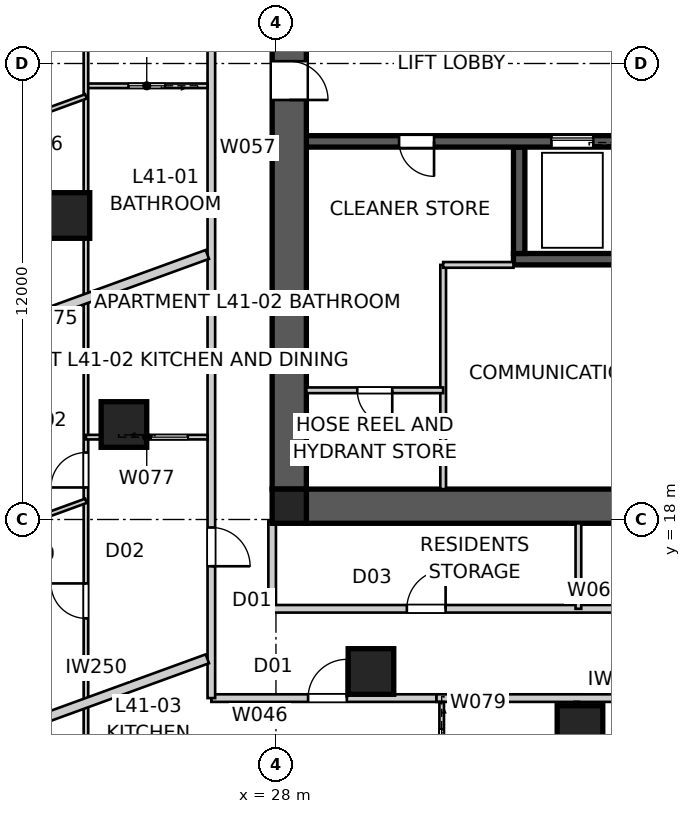
"""IFC4 building model, lengths in metres.
Left out: names, types, materials, properties, quantities, classifications, styles, units other than length and angle.
Written with IfcOpenShell. Run it as: python <this file> out.ifc"""

import sys

from ifc_helpers import new_model, si_unit, direction, frame, frame_2d, origin, origin_2d, place, context, subcontext, project, spatial, polyline, rectangle, outline, extrude, element, fill, save


model = new_model("IFC4")
c1 = context("Model", 3, precision=1e-05, world=origin(), true_north=direction((0.0, 1.0)))
c2 = subcontext(c1, "Body", "Model", "MODEL_VIEW")
j1 = project(units=[si_unit("LENGTHUNIT", "METRE"), si_unit("PLANEANGLEUNIT", "RADIAN")], contexts=[c1])
p1 = place(None, origin())
s1 = spatial("IfcSite", under=j1, at=p1, CompositionType="ELEMENT")
p2 = place(p1, origin())
s2 = spatial("IfcBuilding", under=s1, at=p2, CompositionType="ELEMENT")
p3 = place(p2, frame((0.0, 0.0, 150.6)))
s3 = spatial("IfcBuildingStorey", under=s2, at=p3, CompositionType="ELEMENT", Elevation=150.6)
p4 = place(p3, frame((51.2, 18.35, 0.0), z_axis=(0.0, 0.0, 1.0), x_axis=(-1.0, 0.0, 0.0)))
e1 = element("IfcWall", 1, at=p4, inside=s3, PredefinedType="SHEAR", context=c2, shape_type="SweptSolid", body=[
    extrude(outline(polyline([(0.0, -0.45), (22.4, -0.45), (22.4, -0.025), (22.85, -0.025), (22.85, 0.025), (22.4, 0.025), (22.4, 0.45), (0.0, 0.45), (0.0, 0.025), (-0.45, 0.025), (-0.45, -0.025), (0.0, -0.025), (0.0, -0.45)])), origin(), (0.0, 0.0, 1.0), 3.4),
])
p5 = place(p3, frame((28.35, 41.2, 0.0), z_axis=(0.0, 0.0, 1.0), x_axis=(0.0, -1.0, 0.0)))
e2 = element("IfcWall", 2, at=p5, inside=s3, PredefinedType="SHEAR", context=c2, shape_type="SweptSolid", body=[
    extrude(outline(polyline([(0.0, -0.45), (22.4, -0.45), (22.4, -0.025), (22.85, -0.025), (22.85, 0.025), (22.4, 0.025), (22.4, 0.45), (0.0, 0.45), (0.0, 0.025), (-0.45, 0.025), (-0.45, -0.025), (0.0, -0.025), (0.0, -0.45)])), origin(), (0.0, 0.0, 1.0), 3.4),
])
p6 = place(p5, frame((11.14, 0.0, 0.0)))
e3 = element("IfcOpeningElement", 3, at=p6, cuts=e2, PredefinedType="OPENING", context=c2, shape_type="SweptSolid", body=[
    extrude(rectangle(XDim=1.02, YDim=2.4, at=frame_2d((0.51, 1.2))), frame((0.0, 0.46, 0.0), z_axis=(0.0, -1.0, 0.0), x_axis=(1.0, 0.0, 0.0)), (0.0, 0.0, 1.0), 0.92),
])
p7 = place(p3, frame((51.2, 27.95, 0.0), z_axis=(0.0, 0.0, 1.0), x_axis=(-1.0, 0.0, 0.0)))
e4 = element("IfcWall", 4, at=p7, inside=s3, PredefinedType="SHEAR", context=c2, shape_type="SweptSolid", body=[
    extrude(rectangle(XDim=22.4, YDim=0.3, at=frame_2d((11.2, 0.0))), origin(), (0.0, 0.0, 1.0), 3.4),
])
p8 = place(p7, frame((19.04, 0.0, 0.0)))
e5 = element("IfcOpeningElement", 5, at=p8, cuts=e4, PredefinedType="OPENING", context=c2, shape_type="SweptSolid", body=[
    extrude(rectangle(XDim=0.92, YDim=2.1, at=frame_2d((0.46, 1.05))), frame((0.0, 0.16, 0.0), z_axis=(0.0, -1.0, 0.0), x_axis=(1.0, 0.0, 0.0)), (0.0, 0.0, 1.0), 0.32),
])
p9 = place(p7, frame((1.265, 0.0, 0.0)))
e6 = element("IfcOpeningElement", 6, at=p9, cuts=e4, PredefinedType="OPENING", context=c2, shape_type="SweptSolid", body=[
    extrude(rectangle(XDim=1.02, YDim=2.1, at=frame_2d((0.51, 1.05))), frame((0.0, 0.16, 0.0), z_axis=(0.0, -1.0, 0.0), x_axis=(1.0, 0.0, 0.0)), (0.0, 0.0, 1.0), 0.32),
])
p10 = place(p7, frame((4.015, 0.0, 0.0)))
e7 = element("IfcOpeningElement", 7, at=p10, cuts=e4, PredefinedType="OPENING", context=c2, shape_type="SweptSolid", body=[
    extrude(rectangle(XDim=0.92, YDim=2.1, at=frame_2d((0.46, 1.05))), frame((0.0, 0.16, 0.0), z_axis=(0.0, -1.0, 0.0), x_axis=(1.0, 0.0, 0.0)), (0.0, 0.0, 1.0), 0.32),
])
p11 = place(p7, frame((6.45, 0.0, 0.0)))
e8 = element("IfcOpeningElement", 8, at=p11, cuts=e4, PredefinedType="OPENING", context=c2, shape_type="SweptSolid", body=[
    extrude(rectangle(XDim=1.1, YDim=2.1, at=frame_2d((0.55, 1.05))), frame((0.0, 0.16, 0.0), z_axis=(0.0, -1.0, 0.0), x_axis=(1.0, 0.0, 0.0)), (0.0, 0.0, 1.0), 0.32),
])
p12 = place(p7, frame((9.25, 0.0, 0.0)))
e9 = element("IfcOpeningElement", 9, at=p12, cuts=e4, PredefinedType="OPENING", context=c2, shape_type="SweptSolid", body=[
    extrude(rectangle(XDim=1.1, YDim=2.1, at=frame_2d((0.55, 1.05))), frame((0.0, 0.16, 0.0), z_axis=(0.0, -1.0, 0.0), x_axis=(1.0, 0.0, 0.0)), (0.0, 0.0, 1.0), 0.32),
])
p13 = place(p7, frame((14.85, 0.0, 0.0)))
e10 = element("IfcOpeningElement", 10, at=p13, cuts=e4, PredefinedType="OPENING", context=c2, shape_type="SweptSolid", body=[
    extrude(rectangle(XDim=1.1, YDim=2.1, at=frame_2d((0.55, 1.05))), frame((0.0, 0.16, 0.0), z_axis=(0.0, -1.0, 0.0), x_axis=(1.0, 0.0, 0.0)), (0.0, 0.0, 1.0), 0.32),
])
p14 = place(p3, frame((45.75, 24.85, 0.0), z_axis=(0.0, 0.0, 1.0), x_axis=(-1.0, 0.0, 0.0)))
e11 = element("IfcWall", 11, at=p14, inside=s3, PredefinedType="SHEAR", context=c2, shape_type="SweptSolid", body=[
    extrude(rectangle(XDim=11.5, YDim=0.3, at=frame_2d((5.75, 0.0))), origin(), (0.0, 0.0, 1.0), 3.4),
])
p15 = place(p3, frame((34.4, 27.8, 0.0), z_axis=(0.0, 0.0, 1.0), x_axis=(0.0, -1.0, 0.0)))
e12 = element("IfcWall", 12, at=p15, inside=s3, PredefinedType="SHEAR", context=c2, shape_type="SweptSolid", body=[
    extrude(rectangle(XDim=2.8, YDim=0.3, at=frame_2d((1.4, 0.0))), origin(), (0.0, 0.0, 1.0), 3.4),
])
p16 = place(p3, frame((28.35, 18.35, 0.0), z_axis=(0.0, 0.0, 1.0), x_axis=(1.0, 0.0, 0.0)))
e13 = element("IfcColumn", 13, at=p16, inside=s3, PredefinedType="COLUMN", context=c2, shape_type="SweptSolid", body=[
    extrude(rectangle(XDim=0.9, YDim=0.9, at=origin_2d()), origin(), (0.0, 0.0, 1.0), 3.4),
])
for number, where, z_axis, x_axis in (
    (14, (22.5, 26.0, 0.0), (0.0, 0.0, 1.0), (1.0, 0.0, 0.0)),
    (15, (24.0, 20.5, 0.0), (0.0, 0.0, 1.0), (1.0, 0.0, 0.0)),
    (16, (30.5, 14.0, 0.0), (0.0, 0.0, 1.0), (1.0, 0.0, 0.0)),
    (17, (36.0, 12.5, 0.0), (0.0, 0.0, 1.0), (1.0, 0.0, 0.0)),
):
    element("IfcColumn", number, at=place(p3, frame(where, z_axis=z_axis, x_axis=x_axis)), inside=s3, PredefinedType="COLUMN", context=c2, shape_type="SweptSolid", body=[
        extrude(rectangle(XDim=1.2, YDim=1.2, at=origin_2d()), origin(), (0.0, 0.0, 1.0), 3.4),
    ])
p17 = place(p3, frame((26.3, 13.3, 0.0), z_axis=(0.0, 0.0, 1.0), x_axis=(1.0, 0.0, 0.0)))
e18 = element("IfcWall", 18, at=p17, inside=s3, PredefinedType="PARTITIONING", context=c2, shape_type="SweptSolid", body=[
    extrude(rectangle(XDim=5.925, YDim=0.2, at=frame_2d((2.962, 0.0))), origin(), (0.0, 0.0, 1.0), 3.25),
])
p18 = place(p17, frame((2.545, 0.0, 0.0)))
e19 = element("IfcOpeningElement", 19, at=p18, cuts=e18, PredefinedType="OPENING", context=c2, shape_type="SweptSolid", body=[
    extrude(rectangle(XDim=1.02, YDim=2.34, at=frame_2d((0.51, 1.17))), frame((0.0, 0.11, 0.0), z_axis=(0.0, -1.0, 0.0), x_axis=(1.0, 0.0, 0.0)), (0.0, 0.0, 1.0), 0.22),
])
p19 = place(p3, frame((32.225, 13.3, 0.0), z_axis=(0.0, 0.0, 1.0), x_axis=(1.0, 0.0, 0.0)))
e20 = element("IfcWall", 20, at=p19, inside=s3, PredefinedType="PARTITIONING", context=c2, shape_type="SweptSolid", body=[
    extrude(rectangle(XDim=1.684, YDim=0.2, at=frame_2d((0.842, 0.0))), origin(), (0.0, 0.0, 1.0), 2.55),
])
p20 = place(p3, frame((33.908, 13.3, 0.0), z_axis=(0.0, 0.0, 1.0), x_axis=(1.0, 0.0, 0.0)))
e21 = element("IfcWall", 21, at=p20, inside=s3, PredefinedType="PARTITIONING", context=c2, shape_type="SweptSolid", body=[
    extrude(rectangle(XDim=12.183, YDim=0.2, at=frame_2d((6.092, 0.0))), origin(), (0.0, 0.0, 1.0), 3.25),
])
p21 = place(p3, frame((26.3, 46.3, 0.0), z_axis=(0.0, 0.0, 1.0), x_axis=(0.0, -1.0, 0.0)))
e22 = element("IfcWall", 22, at=p21, inside=s3, PredefinedType="PARTITIONING", context=c2, shape_type="SweptSolid", body=[
    extrude(rectangle(XDim=33.0, YDim=0.2, at=frame_2d((16.5, 0.0))), origin(), (0.0, 0.0, 1.0), 3.25),
])
p22 = place(p21, frame((13.229, 0.0, 0.0)))
e23 = element("IfcOpeningElement", 23, at=p22, cuts=e22, PredefinedType="OPENING", context=c2, shape_type="SweptSolid", body=[
    extrude(rectangle(XDim=1.02, YDim=2.34, at=frame_2d((0.51, 1.17))), frame((0.0, 0.11, 0.0), z_axis=(0.0, -1.0, 0.0), x_axis=(1.0, 0.0, 0.0)), (0.0, 0.0, 1.0), 0.22),
])
p23 = place(p21, frame((28.51, 0.0, 0.0)))
e24 = element("IfcOpeningElement", 24, at=p23, cuts=e22, PredefinedType="OPENING", context=c2, shape_type="SweptSolid", body=[
    extrude(rectangle(XDim=1.02, YDim=2.34, at=frame_2d((0.51, 1.17))), frame((0.0, 0.11, 0.0), z_axis=(0.0, -1.0, 0.0), x_axis=(1.0, 0.0, 0.0)), (0.0, 0.0, 1.0), 0.22),
])
p24 = place(p21, frame((1.998, 0.0, 0.0)))
e25 = element("IfcOpeningElement", 25, at=p24, cuts=e22, PredefinedType="OPENING", context=c2, shape_type="SweptSolid", body=[
    extrude(rectangle(XDim=1.02, YDim=2.34, at=frame_2d((0.51, 1.17))), frame((0.0, 0.11, 0.0), z_axis=(0.0, -1.0, 0.0), x_axis=(1.0, 0.0, 0.0)), (0.0, 0.0, 1.0), 0.22),
])
p25 = place(p3, frame((17.447, 21.792, 0.0), z_axis=(0.0, 0.0, 1.0), x_axis=(0.939693071685, 0.342018904489, 0.0)))
e26 = element("IfcWall", 26, at=p25, inside=s3, PredefinedType="PARTITIONING", context=c2, shape_type="SweptSolid", body=[
    extrude(rectangle(XDim=9.309, YDim=0.25, at=frame_2d((4.654, 0.0))), origin(), (0.0, 0.0, 1.0), 3.25),
])
p26 = place(p3, frame((20.868, 12.395, 0.0), z_axis=(0.0, 0.0, 1.0), x_axis=(0.939690274876, 0.342026588591, 0.0)))
e27 = element("IfcWall", 27, at=p26, inside=s3, PredefinedType="PARTITIONING", context=c2, shape_type="SweptSolid", body=[
    extrude(rectangle(XDim=5.669, YDim=0.25, at=frame_2d((2.834, 0.0))), origin(), (0.0, 0.0, 1.0), 3.25),
])
p27 = place(p3, frame((32.4, 18.8, 0.0), z_axis=(0.0, 0.0, 1.0), x_axis=(0.0, 1.0, 0.0)))
e28 = element("IfcWall", 28, at=p27, inside=s3, PredefinedType="SOLIDWALL", context=c2, shape_type="SweptSolid", body=[
    extrude(rectangle(XDim=5.9, YDim=0.15, at=frame_2d((2.95, 0.0))), origin(), (0.0, 0.0, 1.0), 3.25),
])
p28 = place(p3, frame((32.4, 24.7, 0.0), z_axis=(0.0, 0.0, 1.0), x_axis=(1.0, 0.0, 0.0)))
e29 = element("IfcWall", 29, at=p28, inside=s3, PredefinedType="SOLIDWALL", context=c2, shape_type="SweptSolid", body=[
    extrude(rectangle(XDim=1.85, YDim=0.15, at=frame_2d((0.925, 0.0))), origin(), (0.0, 0.0, 1.0), 3.25),
])
p29 = place(p3, frame((32.4, 21.4, 0.0), z_axis=(0.0, 0.0, 1.0), x_axis=(-1.0, 0.0, 0.0)))
e30 = element("IfcWall", 30, at=p29, inside=s3, PredefinedType="SOLIDWALL", context=c2, shape_type="SweptSolid", body=[
    extrude(rectangle(XDim=3.6, YDim=0.15, at=frame_2d((1.8, 0.0))), origin(), (0.0, 0.0, 1.0), 3.25),
])
p30 = place(p29, frame((1.34, 0.0, 0.0)))
e31 = element("IfcOpeningElement", 31, at=p30, cuts=e30, PredefinedType="OPENING", context=c2, shape_type="SweptSolid", body=[
    extrude(rectangle(XDim=0.92, YDim=2.1, at=frame_2d((0.46, 1.05))), frame((0.0, 0.085, 0.0), z_axis=(0.0, -1.0, 0.0), x_axis=(1.0, 0.0, 0.0)), (0.0, 0.0, 1.0), 0.17),
])
p31 = place(p3, frame((27.9, 17.95, 0.0), z_axis=(0.0, 0.0, 1.0), x_axis=(0.0, -1.0, 0.0)))
e32 = element("IfcWall", 32, at=p31, inside=s3, PredefinedType="PARTITIONING", context=c2, shape_type="SweptSolid", body=[
    extrude(rectangle(XDim=2.3, YDim=0.2, at=frame_2d((1.15, 0.0))), origin(), (0.0, 0.0, 1.0), 3.25),
])
p32 = place(p3, frame((27.9, 15.65, 0.0), z_axis=(0.0, 0.0, 1.0), x_axis=(1.0, 0.0, 0.0)))
e33 = element("IfcWall", 33, at=p32, inside=s3, PredefinedType="PARTITIONING", context=c2, shape_type="SweptSolid", body=[
    extrude(rectangle(XDim=24.2, YDim=0.2, at=frame_2d((12.1, 0.0))), origin(), (0.0, 0.0, 1.0), 3.25),
])
p33 = place(p32, frame((12.437, 0.0, 0.0)))
e34 = element("IfcOpeningElement", 34, at=p33, cuts=e33, PredefinedType="OPENING", context=c2, shape_type="SweptSolid", body=[
    extrude(rectangle(XDim=1.02, YDim=2.1, at=frame_2d((0.51, 1.05))), frame((0.0, 0.11, 0.0), z_axis=(0.0, -1.0, 0.0), x_axis=(1.0, 0.0, 0.0)), (0.0, 0.0, 1.0), 0.22),
])
p34 = place(p32, frame((3.544, 0.0, 0.0)))
e35 = element("IfcOpeningElement", 35, at=p34, cuts=e33, PredefinedType="OPENING", context=c2, shape_type="SweptSolid", body=[
    extrude(rectangle(XDim=1.02, YDim=2.1, at=frame_2d((0.51, 1.05))), frame((0.0, 0.11, 0.0), z_axis=(0.0, -1.0, 0.0), x_axis=(1.0, 0.0, 0.0)), (0.0, 0.0, 1.0), 0.22),
])
p35 = place(p32, frame((19.883, 0.0, 0.0)))
e36 = element("IfcOpeningElement", 36, at=p35, cuts=e33, PredefinedType="OPENING", context=c2, shape_type="SweptSolid", body=[
    extrude(rectangle(XDim=1.02, YDim=2.1, at=frame_2d((0.51, 1.05))), frame((0.0, 0.11, 0.0), z_axis=(0.0, -1.0, 0.0), x_axis=(1.0, 0.0, 0.0)), (0.0, 0.0, 1.0), 0.22),
])
p36 = place(p3, frame((35.958, 15.65, 0.0), z_axis=(0.0, 0.0, 1.0), x_axis=(0.0, 1.0, 0.0)))
e37 = element("IfcWall", 37, at=p36, inside=s3, PredefinedType="SOLIDWALL", context=c2, shape_type="SweptSolid", body=[
    extrude(rectangle(XDim=2.25, YDim=0.15, at=frame_2d((1.125, 0.0))), origin(), (0.0, 0.0, 1.0), 3.25),
])
p37 = place(p3, frame((26.2, 29.413, 0.0), z_axis=(0.0, 0.0, 1.0), x_axis=(-1.0, 0.0, 0.0)))
e38 = element("IfcWall", 38, at=p37, inside=s3, PredefinedType="PARTITIONING", context=c2, shape_type="SweptSolid", body=[
    extrude(rectangle(XDim=3.2, YDim=0.12, at=frame_2d((1.6, 0.0))), origin(), (0.0, 0.0, 1.0), 3.25),
])
p38 = place(p37, frame((1.12, 0.0, 0.0)))
e39 = element("IfcOpeningElement", 39, at=p38, cuts=e38, PredefinedType="OPENING", context=c2, shape_type="SweptSolid", body=[
    extrude(rectangle(XDim=0.96, YDim=2.1, at=frame_2d((0.48, 1.05))), frame((0.0, 0.07, 0.0), z_axis=(0.0, -1.0, 0.0), x_axis=(1.0, 0.0, 0.0)), (0.0, 0.0, 1.0), 0.14),
])
p39 = place(p3, frame((23.0, 10.8, 0.0), z_axis=(0.0, 0.0, 1.0), x_axis=(0.0, 1.0, 0.0)))
e40 = element("IfcWall", 40, at=p39, inside=s3, PredefinedType="PARTITIONING", context=c2, shape_type="SweptSolid", body=[
    extrude(rectangle(XDim=38.0, YDim=0.12, at=frame_2d((19.0, 0.0))), origin(), (0.0, 0.0, 1.0), 2.55),
])
p40 = place(p39, frame((20.674, 0.0, 0.0)))
e41 = element("IfcOpeningElement", 41, at=p40, cuts=e40, PredefinedType="OPENING", context=c2, shape_type="SweptSolid", body=[
    extrude(rectangle(XDim=0.92, YDim=2.34, at=frame_2d((0.46, 1.17))), frame((0.0, 0.07, 0.0), z_axis=(0.0, -1.0, 0.0), x_axis=(1.0, 0.0, 0.0)), (0.0, 0.0, 1.0), 0.14),
])
p41 = place(p39, frame((4.598, 0.0, 0.0)))
e42 = element("IfcOpeningElement", 42, at=p41, cuts=e40, PredefinedType="OPENING", context=c2, shape_type="SweptSolid", body=[
    extrude(rectangle(XDim=0.92, YDim=2.34, at=frame_2d((0.46, 1.17))), frame((0.0, 0.07, 0.0), z_axis=(0.0, -1.0, 0.0), x_axis=(1.0, 0.0, 0.0)), (0.0, 0.0, 1.0), 0.14),
])
p42 = place(p39, frame((8.043, 0.0, 0.0)))
e43 = element("IfcOpeningElement", 43, at=p42, cuts=e40, PredefinedType="OPENING", context=c2, shape_type="SweptSolid", body=[
    extrude(rectangle(XDim=0.92, YDim=2.34, at=frame_2d((0.46, 1.17))), frame((0.0, 0.07, 0.0), z_axis=(0.0, -1.0, 0.0), x_axis=(1.0, 0.0, 0.0)), (0.0, 0.0, 1.0), 0.14),
])
p43 = place(p39, frame((33.957, 0.0, 0.0)))
e44 = element("IfcOpeningElement", 44, at=p43, cuts=e40, PredefinedType="OPENING", context=c2, shape_type="SweptSolid", body=[
    extrude(rectangle(XDim=0.92, YDim=2.34, at=frame_2d((0.46, 1.17))), frame((0.0, 0.07, 0.0), z_axis=(0.0, -1.0, 0.0), x_axis=(1.0, 0.0, 0.0)), (0.0, 0.0, 1.0), 0.14),
])
p44 = place(p39, frame((26.957, 0.0, 0.0)))
e45 = element("IfcOpeningElement", 45, at=p44, cuts=e40, PredefinedType="OPENING", context=c2, shape_type="SweptSolid", body=[
    extrude(rectangle(XDim=0.96, YDim=2.1, at=frame_2d((0.48, 1.05))), frame((0.0, 0.07, 0.0), z_axis=(0.0, -1.0, 0.0), x_axis=(1.0, 0.0, 0.0)), (0.0, 0.0, 1.0), 0.14),
])
p45 = place(p3, frame((23.0, 29.134, 0.0), z_axis=(0.0, 0.0, 1.0), x_axis=(-0.939685835373, -0.342038785519, 0.0)))
e46 = element("IfcWall", 46, at=p45, inside=s3, PredefinedType="PARTITIONING", context=c2, shape_type="SweptSolid", body=[
    extrude(rectangle(XDim=7.689, YDim=0.12, at=frame_2d((3.844, 0.0))), origin(), (0.0, 0.0, 1.0), 3.25),
])
p46 = place(p45, frame((3.404, 0.0, 0.0)))
e47 = element("IfcOpeningElement", 47, at=p46, cuts=e46, PredefinedType="OPENING", context=c2, shape_type="SweptSolid", body=[
    extrude(rectangle(XDim=0.92, YDim=2.34, at=frame_2d((0.46, 1.17))), frame((0.0, 0.07, 0.0), z_axis=(0.0, -1.0, 0.0), x_axis=(1.0, 0.0, 0.0)), (0.0, 0.0, 1.0), 0.14),
])
p47 = place(p3, frame((23.0, 20.167, 0.0), z_axis=(0.0, 0.0, 1.0), x_axis=(1.0, 0.0, 0.0)))
e48 = element("IfcWall", 48, at=p47, inside=s3, PredefinedType="PARTITIONING", context=c2, shape_type="SweptSolid", body=[
    extrude(rectangle(XDim=3.2, YDim=0.12, at=frame_2d((1.6, 0.0))), origin(), (0.0, 0.0, 1.0), 3.25),
])
p48 = place(p47, frame((1.72, 0.0, 0.0)))
e49 = element("IfcOpeningElement", 49, at=p48, cuts=e48, PredefinedType="OPENING", context=c2, shape_type="SweptSolid", body=[
    extrude(rectangle(XDim=0.96, YDim=2.1, at=frame_2d((0.48, 1.05))), frame((0.0, 0.07, 0.0), z_axis=(0.0, -1.0, 0.0), x_axis=(1.0, 0.0, 0.0)), (0.0, 0.0, 1.0), 0.14),
])
p49 = place(p3, frame((23.0, 18.492, 0.0), z_axis=(0.0, 0.0, 1.0), x_axis=(-0.939682468191, -0.342048036063, 0.0)))
e50 = element("IfcWall", 50, at=p49, inside=s3, PredefinedType="PARTITIONING", context=c2, shape_type="SweptSolid", body=[
    extrude(rectangle(XDim=4.049, YDim=0.12, at=frame_2d((2.024, 0.0))), origin(), (0.0, 0.0, 1.0), 3.25),
])
p50 = place(p3, frame((32.361, 13.2, 0.0), z_axis=(0.0, 0.0, 1.0), x_axis=(0.0, -1.0, 0.0)))
e51 = element("IfcWall", 51, at=p50, inside=s3, PredefinedType="PARTITIONING", context=c2, shape_type="SweptSolid", body=[
    extrude(rectangle(XDim=2.4, YDim=0.12, at=frame_2d((1.2, 0.0))), origin(), (0.0, 0.0, 1.0), 3.25),
])
p51 = place(p50, frame((0.72, 0.0, 0.0)))
e52 = element("IfcOpeningElement", 52, at=p51, cuts=e51, PredefinedType="OPENING", context=c2, shape_type="SweptSolid", body=[
    extrude(rectangle(XDim=0.96, YDim=2.1, at=frame_2d((0.48, 1.05))), frame((0.0, 0.07, 0.0), z_axis=(0.0, -1.0, 0.0), x_axis=(1.0, 0.0, 0.0)), (0.0, 0.0, 1.0), 0.14),
])
p52 = place(p3, frame((35.916, 10.8, 0.0), z_axis=(0.0, 0.0, 1.0), x_axis=(0.0, 1.0, 0.0)))
e53 = element("IfcWall", 53, at=p52, inside=s3, PredefinedType="PARTITIONING", context=c2, shape_type="SweptSolid", body=[
    extrude(rectangle(XDim=2.4, YDim=0.12, at=frame_2d((1.2, 0.0))), origin(), (0.0, 0.0, 1.0), 3.25),
])
p53 = place(p8, origin())
e54 = element("IfcDoor", 54, at=p53, inside=s3, OperationType="SINGLE_SWING_LEFT", PredefinedType="DOOR", context=c2, shape_type="SweptSolid", body=[
    extrude(rectangle(XDim=0.92, YDim=2.1, at=frame_2d((0.46, 1.05))), frame((0.0, 0.025, 0.0), z_axis=(0.0, -1.0, 0.0), x_axis=(1.0, 0.0, 0.0)), (0.0, 0.0, 1.0), 0.05),
])
fill(e5, e54)
p54 = place(p34, origin())
e55 = element("IfcDoor", 55, at=p54, inside=s3, OperationType="SINGLE_SWING_RIGHT", PredefinedType="DOOR", context=c2, shape_type="SweptSolid", body=[
    extrude(rectangle(XDim=1.02, YDim=2.1, at=frame_2d((0.51, 1.05))), frame((0.0, 0.025, 0.0), z_axis=(0.0, -1.0, 0.0), x_axis=(1.0, 0.0, 0.0)), (0.0, 0.0, 1.0), 0.05),
])
fill(e35, e55)
p55 = place(p23, origin())
e56 = element("IfcDoor", 56, at=p55, inside=s3, OperationType="SINGLE_SWING_RIGHT", PredefinedType="DOOR", context=c2, shape_type="SweptSolid", body=[
    extrude(rectangle(XDim=1.02, YDim=2.34, at=frame_2d((0.51, 1.17))), frame((0.0, 0.025, 0.0), z_axis=(0.0, -1.0, 0.0), x_axis=(1.0, 0.0, 0.0)), (0.0, 0.0, 1.0), 0.05),
])
fill(e24, e56)
p56 = place(p18, origin())
e57 = element("IfcDoor", 57, at=p56, inside=s3, OperationType="SINGLE_SWING_RIGHT", PredefinedType="DOOR", context=c2, shape_type="SweptSolid", body=[
    extrude(rectangle(XDim=1.02, YDim=2.34, at=frame_2d((0.51, 1.17))), frame((0.0, 0.025, 0.0), z_axis=(0.0, -1.0, 0.0), x_axis=(1.0, 0.0, 0.0)), (0.0, 0.0, 1.0), 0.05),
])
fill(e19, e57)
p57 = place(p30, origin())
e58 = element("IfcDoor", 58, at=p57, inside=s3, OperationType="SINGLE_SWING_LEFT", PredefinedType="DOOR", context=c2, shape_type="SweptSolid", body=[
    extrude(rectangle(XDim=0.92, YDim=2.1, at=frame_2d((0.46, 1.05))), frame((0.0, 0.025, 0.0), z_axis=(0.0, -1.0, 0.0), x_axis=(1.0, 0.0, 0.0)), (0.0, 0.0, 1.0), 0.05),
])
fill(e31, e58)
p58 = place(p38, origin())
e59 = element("IfcDoor", 59, at=p58, inside=s3, OperationType="SLIDING_TO_LEFT", PredefinedType="DOOR", context=c2, shape_type="SweptSolid", body=[
    extrude(rectangle(XDim=0.96, YDim=2.1, at=frame_2d((0.48, 1.05))), frame((0.0, 0.025, 0.0), z_axis=(0.0, -1.0, 0.0), x_axis=(1.0, 0.0, 0.0)), (0.0, 0.0, 1.0), 0.05),
])
fill(e39, e59)
p59 = place(p41, origin())
e60 = element("IfcDoor", 60, at=p59, inside=s3, OperationType="SINGLE_SWING_RIGHT", PredefinedType="DOOR", context=c2, shape_type="SweptSolid", body=[
    extrude(rectangle(XDim=0.92, YDim=2.34, at=frame_2d((0.46, 1.17))), frame((0.0, 0.025, 0.0), z_axis=(0.0, -1.0, 0.0), x_axis=(1.0, 0.0, 0.0)), (0.0, 0.0, 1.0), 0.05),
])
fill(e42, e60)
p60 = place(p48, origin())
e61 = element("IfcDoor", 61, at=p60, inside=s3, OperationType="SLIDING_TO_LEFT", PredefinedType="DOOR", context=c2, shape_type="SweptSolid", body=[
    extrude(rectangle(XDim=0.96, YDim=2.1, at=frame_2d((0.48, 1.05))), frame((0.0, 0.025, 0.0), z_axis=(0.0, -1.0, 0.0), x_axis=(1.0, 0.0, 0.0)), (0.0, 0.0, 1.0), 0.05),
])
fill(e49, e61)
p61 = place(p42, origin())
e62 = element("IfcDoor", 62, at=p61, inside=s3, OperationType="SINGLE_SWING_LEFT", PredefinedType="DOOR", context=c2, shape_type="SweptSolid", body=[
    extrude(rectangle(XDim=0.92, YDim=2.34, at=frame_2d((0.46, 1.17))), frame((0.0, 0.025, 0.0), z_axis=(0.0, -1.0, 0.0), x_axis=(1.0, 0.0, 0.0)), (0.0, 0.0, 1.0), 0.05),
])
fill(e43, e62)
p62 = place(p51, origin())
e63 = element("IfcDoor", 63, at=p62, inside=s3, OperationType="SLIDING_TO_LEFT", PredefinedType="DOOR", context=c2, shape_type="SweptSolid", body=[
    extrude(rectangle(XDim=0.96, YDim=2.1, at=frame_2d((0.48, 1.05))), frame((0.0, 0.025, 0.0), z_axis=(0.0, -1.0, 0.0), x_axis=(1.0, 0.0, 0.0)), (0.0, 0.0, 1.0), 0.05),
])
fill(e52, e63)
p63 = place(p6, origin())
e64 = element("IfcDoor", 64, at=p63, inside=s3, OperationType="SINGLE_SWING_RIGHT", PredefinedType="DOOR", context=c2, shape_type="SweptSolid", body=[
    extrude(rectangle(XDim=1.02, YDim=2.4, at=frame_2d((0.51, 1.2))), frame((0.0, 0.025, 0.0), z_axis=(0.0, -1.0, 0.0), x_axis=(1.0, 0.0, 0.0)), (0.0, 0.0, 1.0), 0.05),
])
fill(e3, e64)
p64 = place(p13, origin())
e65 = element("IfcDoor", 65, at=p64, inside=s3, OperationType="SLIDING_TO_LEFT", PredefinedType="DOOR", context=c2, shape_type="SweptSolid", body=[
    extrude(rectangle(XDim=1.1, YDim=2.1, at=frame_2d((0.55, 1.05))), frame((0.0, 0.025, 0.0), z_axis=(0.0, -1.0, 0.0), x_axis=(1.0, 0.0, 0.0)), (0.0, 0.0, 1.0), 0.05),
])
fill(e10, e65)
save(model, sys.argv[1])
